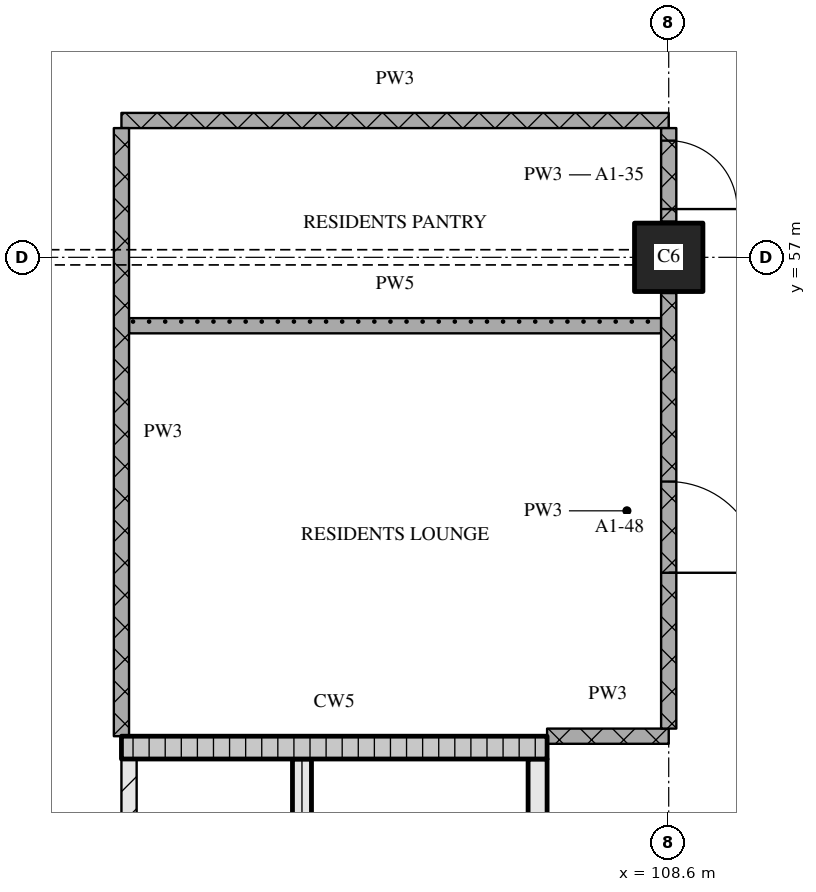
"""IFC4 building model, lengths in metres.
Left out: names, types, materials, properties, quantities, classifications, styles, units other than length and angle.
Written with IfcOpenShell. Run it as: python <this file> out.ifc"""

import sys

from ifc_helpers import new_model, si_unit, direction, frame, frame_2d, origin, origin_2d, place, context, subcontext, project, spatial, rectangle, extrude, element, fill, save


model = new_model("IFC4")
c1 = context("Model", 3, precision=1e-05, world=origin(), true_north=direction((0.0, 1.0)))
c2 = subcontext(c1, "Body", "Model", "MODEL_VIEW")
j1 = project(units=[si_unit("LENGTHUNIT", "METRE"), si_unit("PLANEANGLEUNIT", "RADIAN")], contexts=[c1])
p1 = place(None, origin())
s1 = spatial("IfcSite", under=j1, at=p1, CompositionType="ELEMENT")
p2 = place(p1, origin())
s2 = spatial("IfcBuilding", under=s1, at=p2, CompositionType="ELEMENT")
p3 = place(p2, frame((0.0, 0.0, 37.2)))
s3 = spatial("IfcBuildingStorey", under=s2, at=p3, CompositionType="ELEMENT", Elevation=37.2)
p4 = place(p3, frame((108.6, 57.0, 0.0), z_axis=(0.0, 0.0, 1.0), x_axis=(1.0, 0.0, 0.0)))
e1 = element("IfcColumn", 1, at=p4, inside=s3, PredefinedType="COLUMN", context=c2, shape_type="SweptSolid", body=[
    extrude(rectangle(XDim=0.9, YDim=0.9, at=origin_2d()), origin(), (0.0, 0.0, 1.0), 3.6),
])
p5 = place(p3, frame((101.5, 43.5, 0.0), z_axis=(0.0, 0.0, 1.0), x_axis=(0.0, 1.0, 0.0)))
e2 = element("IfcWall", 2, at=p5, inside=s3, PredefinedType="PARTITIONING", context=c2, shape_type="SweptSolid", body=[
    extrude(rectangle(XDim=6.9, YDim=0.2, at=frame_2d((3.45, 0.0))), origin(), (0.0, 0.0, 1.0), 3.32),
])
p6 = place(p5, frame((1.0, 0.0, 0.0)))
e3 = element("IfcOpeningElement", 3, at=p6, cuts=e2, PredefinedType="OPENING", context=c2, shape_type="SweptSolid", body=[
    extrude(rectangle(XDim=1.0, YDim=2.1, at=frame_2d((0.5, 1.05))), frame((0.0, 0.11, 0.0), z_axis=(0.0, -1.0, 0.0), x_axis=(1.0, 0.0, 0.0)), (0.0, 0.0, 1.0), 0.22),
])
p7 = place(p3, frame((103.775, 43.5, 0.0), z_axis=(0.0, 0.0, 1.0), x_axis=(0.0, 1.0, 0.0)))
e4 = element("IfcWall", 4, at=p7, inside=s3, PredefinedType="SOLIDWALL", context=c2, shape_type="SweptSolid", body=[
    extrude(rectangle(XDim=6.9, YDim=0.25, at=frame_2d((3.45, 0.0))), origin(), (0.0, 0.0, 1.0), 3.32),
])
p8 = place(p7, frame((0.2, 0.0, 0.0)))
e5 = element("IfcOpeningElement", 5, at=p8, cuts=e4, PredefinedType="OPENING", context=c2, shape_type="SweptSolid", body=[
    extrude(rectangle(XDim=1.0, YDim=2.1, at=frame_2d((0.5, 1.05))), frame((0.0, 0.135, 0.0), z_axis=(0.0, -1.0, 0.0), x_axis=(1.0, 0.0, 0.0)), (0.0, 0.0, 1.0), 0.27),
])
p9 = place(p3, frame((106.875, 43.5, 0.0), z_axis=(0.0, 0.0, 1.0), x_axis=(0.0, 1.0, 0.0)))
e6 = element("IfcWall", 6, at=p9, inside=s3, PredefinedType="SOLIDWALL", context=c2, shape_type="SweptSolid", body=[
    extrude(rectangle(XDim=6.9, YDim=0.25, at=frame_2d((3.45, 0.0))), origin(), (0.0, 0.0, 1.0), 3.32),
])
p10 = place(p3, frame((101.4, 50.55, 0.0), z_axis=(0.0, 0.0, 1.0), x_axis=(1.0, 0.0, 0.0)))
e7 = element("IfcWall", 7, at=p10, inside=s3, PredefinedType="SOLIDWALL", context=c2, shape_type="SweptSolid", body=[
    extrude(rectangle(XDim=5.6, YDim=0.3, at=frame_2d((2.8, 0.0))), origin(), (0.0, 0.0, 1.0), 3.32),
])
p11 = place(p3, frame((107.0, 50.7, 0.0), z_axis=(0.0, 0.0, 1.0), x_axis=(1.0, 0.0, 0.0)))
e8 = element("IfcWall", 8, at=p11, inside=s3, PredefinedType="PARTITIONING", context=c2, shape_type="SweptSolid", body=[
    extrude(rectangle(XDim=1.6, YDim=0.2, at=frame_2d((0.8, 0.0))), origin(), (0.0, 0.0, 1.0), 3.32),
])
p12 = place(p3, frame((101.5, 56.1, 0.0), z_axis=(0.0, 0.0, 1.0), x_axis=(1.0, 0.0, 0.0)))
e9 = element("IfcWall", 9, at=p12, inside=s3, PredefinedType="PARTITIONING", context=c2, shape_type="SweptSolid", body=[
    extrude(rectangle(XDim=7.0, YDim=0.2, at=frame_2d((3.5, 0.0))), origin(), (0.0, 0.0, 1.0), 3.32),
])
p13 = place(p3, frame((101.4, 58.8, 0.0), z_axis=(0.0, 0.0, 1.0), x_axis=(1.0, 0.0, 0.0)))
e10 = element("IfcWall", 10, at=p13, inside=s3, PredefinedType="PARTITIONING", context=c2, shape_type="SweptSolid", body=[
    extrude(rectangle(XDim=7.2, YDim=0.2, at=frame_2d((3.6, 0.0))), origin(), (0.0, 0.0, 1.0), 3.32),
])
p14 = place(p3, frame((101.4, 58.7, 0.0), z_axis=(0.0, 0.0, 1.0), x_axis=(0.0, -1.0, 0.0)))
e11 = element("IfcWall", 11, at=p14, inside=s3, PredefinedType="PARTITIONING", context=c2, shape_type="SweptSolid", body=[
    extrude(rectangle(XDim=8.0, YDim=0.2, at=frame_2d((4.0, 0.0))), origin(), (0.0, 0.0, 1.0), 3.32),
])
p15 = place(p3, frame((108.6, 50.8, 0.0), z_axis=(0.0, 0.0, 1.0), x_axis=(0.0, 1.0, 0.0)))
e12 = element("IfcWall", 12, at=p15, inside=s3, PredefinedType="PARTITIONING", context=c2, shape_type="SweptSolid", body=[
    extrude(rectangle(XDim=5.73, YDim=0.2, at=frame_2d((2.865, 0.0))), origin(), (0.0, 0.0, 1.0), 3.32),
])
p16 = place(p15, frame((2.05, 0.0, 0.0)))
e13 = element("IfcOpeningElement", 13, at=p16, cuts=e12, PredefinedType="OPENING", context=c2, shape_type="SweptSolid", body=[
    extrude(rectangle(XDim=1.2, YDim=2.1, at=frame_2d((0.6, 1.05))), frame((0.0, 0.11, 0.0), z_axis=(0.0, -1.0, 0.0), x_axis=(1.0, 0.0, 0.0)), (0.0, 0.0, 1.0), 0.22),
])
p17 = place(p3, frame((108.6, 57.47, 0.0), z_axis=(0.0, 0.0, 1.0), x_axis=(0.0, 1.0, 0.0)))
e14 = element("IfcWall", 14, at=p17, inside=s3, PredefinedType="PARTITIONING", context=c2, shape_type="SweptSolid", body=[
    extrude(rectangle(XDim=1.23, YDim=0.2, at=frame_2d((0.615, 0.0))), origin(), (0.0, 0.0, 1.0), 3.32),
])
p18 = place(p17, frame((0.165, 0.0, 0.0)))
e15 = element("IfcOpeningElement", 15, at=p18, cuts=e14, PredefinedType="OPENING", context=c2, shape_type="SweptSolid", body=[
    extrude(rectangle(XDim=0.9, YDim=2.1, at=frame_2d((0.45, 1.05))), frame((0.0, 0.11, 0.0), z_axis=(0.0, -1.0, 0.0), x_axis=(1.0, 0.0, 0.0)), (0.0, 0.0, 1.0), 0.22),
])
p19 = place(p16, origin())
e16 = element("IfcDoor", 16, at=p19, inside=s3, OperationType="SINGLE_SWING_RIGHT", PredefinedType="DOOR", context=c2, shape_type="SweptSolid", body=[
    extrude(rectangle(XDim=1.2, YDim=2.1, at=frame_2d((0.6, 1.05))), frame((0.0, 0.025, 0.0), z_axis=(0.0, -1.0, 0.0), x_axis=(1.0, 0.0, 0.0)), (0.0, 0.0, 1.0), 0.05),
])
fill(e13, e16)
p20 = place(p18, origin())
e17 = element("IfcDoor", 17, at=p20, inside=s3, OperationType="SINGLE_SWING_RIGHT", PredefinedType="DOOR", context=c2, shape_type="SweptSolid", body=[
    extrude(rectangle(XDim=0.9, YDim=2.1, at=frame_2d((0.45, 1.05))), frame((0.0, 0.025, 0.0), z_axis=(0.0, -1.0, 0.0), x_axis=(1.0, 0.0, 0.0)), (0.0, 0.0, 1.0), 0.05),
])
fill(e15, e17)
save(model, sys.argv[1])
